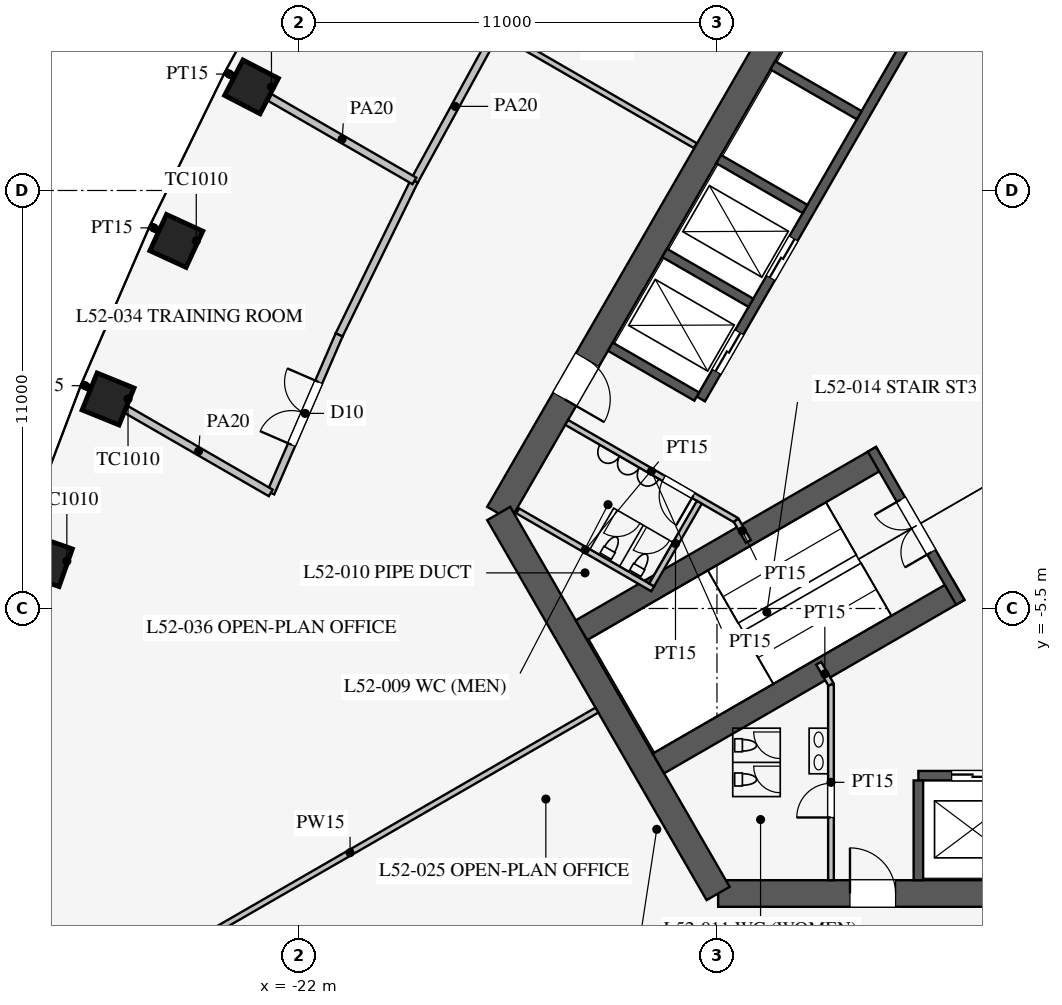
"""IFC4 building model, lengths in metres.
Left out: names, types, materials, properties, quantities, classifications, styles, units other than length and angle.
Written with IfcOpenShell. Run it as: python <this file> out.ifc"""

import sys

from ifc_helpers import new_model, si_unit, direction, frame, frame_2d, origin, origin_2d, place, context, subcontext, project, spatial, rectangle, extrude, element, fill, save


model = new_model("IFC4")
c1 = context("Model", 3, precision=1e-05, world=origin(), true_north=direction((0.0, 1.0)))
c2 = subcontext(c1, "Body", "Model", "MODEL_VIEW")
j1 = project(units=[si_unit("LENGTHUNIT", "METRE"), si_unit("PLANEANGLEUNIT", "RADIAN")], contexts=[c1])
p1 = place(None, origin())
s1 = spatial("IfcSite", under=j1, at=p1, CompositionType="ELEMENT")
p2 = place(p1, origin())
s2 = spatial("IfcBuilding", under=s1, at=p2, CompositionType="ELEMENT")
p3 = place(p2, frame((0.0, 0.0, 227.5)))
s3 = spatial("IfcBuildingStorey", under=s2, at=p3, CompositionType="ELEMENT", Elevation=227.5)
for number, where, z_axis, x_axis in (
    (1, (-23.248, 8.226, 0.0), (0.0, 0.0, 1.0), (-0.46, -0.888, 0.0)),
    (2, (-25.227, 4.172, 0.0), (0.0, 0.0, 1.0), (-0.418, -0.908, 0.0)),
    (3, (-27.022, 0.013, 0.0), (0.0, 0.0, 1.0), (-0.376, -0.927, 0.0)),
    (4, (-28.632, -4.254, 0.0), (0.0, 0.0, 1.0), (-0.332, -0.943, 0.0)),
):
    element("IfcColumn", number, at=place(p3, frame(where, z_axis=z_axis, x_axis=x_axis)), inside=s3, PredefinedType="COLUMN", context=c2, shape_type="SweptSolid", body=[
        extrude(rectangle(XDim=1.05, YDim=1.05, at=origin_2d()), origin(), (0.0, 0.0, 1.0), 4.2),
    ])
p4 = place(p3, frame((-10.97, -13.0, 0.0), z_axis=(0.0, 0.0, 1.0), x_axis=(1.0, 0.0, 0.0)))
e5 = element("IfcWall", 5, at=p4, inside=s3, PredefinedType="SHEAR", context=c2, shape_type="SweptSolid", body=[
    extrude(rectangle(XDim=21.939, YDim=0.7, at=frame_2d((10.97, 0.0))), origin(), (0.0, 0.0, 1.0), 4.2),
])
p5 = place(p4, frame((17.27, 0.0, 0.0)))
e6 = element("IfcOpeningElement", 6, at=p5, cuts=e5, PredefinedType="OPENING", context=c2, shape_type="SweptSolid", body=[
    extrude(rectangle(XDim=1.2, YDim=2.1, at=frame_2d((0.6, 1.05))), frame((0.0, 0.36, 0.0), z_axis=(0.0, -1.0, 0.0), x_axis=(1.0, 0.0, 0.0)), (0.0, 0.0, 1.0), 0.72),
])
p6 = place(p4, frame((3.47, 0.0, 0.0)))
e7 = element("IfcOpeningElement", 7, at=p6, cuts=e5, PredefinedType="OPENING", context=c2, shape_type="SweptSolid", body=[
    extrude(rectangle(XDim=1.2, YDim=2.1, at=frame_2d((0.6, 1.05))), frame((0.0, 0.36, 0.0), z_axis=(0.0, -1.0, 0.0), x_axis=(1.0, 0.0, 0.0)), (0.0, 0.0, 1.0), 0.72),
])
p7 = place(p3, frame((-5.773, 16.0, 0.0), z_axis=(0.0, 0.0, 1.0), x_axis=(-0.500002442456, -0.866023993627, 0.0)))
e8 = element("IfcWall", 8, at=p7, inside=s3, PredefinedType="SHEAR", context=c2, shape_type="SweptSolid", body=[
    extrude(rectangle(XDim=21.939, YDim=0.7, at=frame_2d((10.97, 0.0))), origin(), (0.0, 0.0, 1.0), 4.2),
])
p8 = place(p7, frame((17.27, 0.0, 0.0)))
e9 = element("IfcOpeningElement", 9, at=p8, cuts=e8, PredefinedType="OPENING", context=c2, shape_type="SweptSolid", body=[
    extrude(rectangle(XDim=1.2, YDim=2.1, at=frame_2d((0.6, 1.05))), frame((0.0, 0.36, 0.0), z_axis=(0.0, -1.0, 0.0), x_axis=(1.0, 0.0, 0.0)), (0.0, 0.0, 1.0), 0.72),
])
p9 = place(p7, frame((3.47, 0.0, 0.0)))
e10 = element("IfcOpeningElement", 10, at=p9, cuts=e8, PredefinedType="OPENING", context=c2, shape_type="SweptSolid", body=[
    extrude(rectangle(XDim=1.2, YDim=2.1, at=frame_2d((0.6, 1.05))), frame((0.0, 0.36, 0.0), z_axis=(0.0, -1.0, 0.0), x_axis=(1.0, 0.0, 0.0)), (0.0, 0.0, 1.0), 0.72),
])
p10 = place(p3, frame((-16.743, -3.0, 0.0), z_axis=(0.0, 0.0, 1.0), x_axis=(0.499995765644, -0.866027848477, 0.0)))
e11 = element("IfcWall", 11, at=p10, inside=s3, PredefinedType="SHEAR", context=c2, shape_type="SweptSolid", body=[
    extrude(rectangle(XDim=11.547, YDim=0.7, at=frame_2d((5.773, 0.0))), origin(), (0.0, 0.0, 1.0), 4.2),
])
p11 = place(p3, frame((-5.7, -9.9, 0.0), z_axis=(0.0, 0.0, 1.0), x_axis=(1.0, 0.0, 0.0)))
e12 = element("IfcWall", 12, at=p11, inside=s3, PredefinedType="SHEAR", context=c2, shape_type="SweptSolid", body=[
    extrude(rectangle(XDim=11.4, YDim=0.25, at=frame_2d((5.7, 0.0))), origin(), (0.0, 0.0, 1.0), 4.2),
])
p12 = place(p11, frame((0.875, 0.0, 0.0)))
e13 = element("IfcOpeningElement", 13, at=p12, cuts=e12, PredefinedType="OPENING", context=c2, shape_type="SweptSolid", body=[
    extrude(rectangle(XDim=1.1, YDim=2.2, at=frame_2d((0.55, 1.1))), frame((0.0, 0.135, 0.0), z_axis=(0.0, -1.0, 0.0), x_axis=(1.0, 0.0, 0.0)), (0.0, 0.0, 1.0), 0.27),
])
p13 = place(p11, frame((3.725, 0.0, 0.0)))
e14 = element("IfcOpeningElement", 14, at=p13, cuts=e12, PredefinedType="OPENING", context=c2, shape_type="SweptSolid", body=[
    extrude(rectangle(XDim=1.1, YDim=2.2, at=frame_2d((0.55, 1.1))), frame((0.0, 0.135, 0.0), z_axis=(0.0, -1.0, 0.0), x_axis=(1.0, 0.0, 0.0)), (0.0, 0.0, 1.0), 0.27),
])
p14 = place(p11, frame((6.575, 0.0, 0.0)))
e15 = element("IfcOpeningElement", 15, at=p14, cuts=e12, PredefinedType="OPENING", context=c2, shape_type="SweptSolid", body=[
    extrude(rectangle(XDim=1.1, YDim=2.2, at=frame_2d((0.55, 1.1))), frame((0.0, 0.135, 0.0), z_axis=(0.0, -1.0, 0.0), x_axis=(1.0, 0.0, 0.0)), (0.0, 0.0, 1.0), 0.27),
])
p15 = place(p11, frame((9.425, 0.0, 0.0)))
e16 = element("IfcOpeningElement", 16, at=p15, cuts=e12, PredefinedType="OPENING", context=c2, shape_type="SweptSolid", body=[
    extrude(rectangle(XDim=1.1, YDim=2.2, at=frame_2d((0.55, 1.1))), frame((0.0, 0.135, 0.0), z_axis=(0.0, -1.0, 0.0), x_axis=(1.0, 0.0, 0.0)), (0.0, 0.0, 1.0), 0.27),
])
p16 = place(p3, frame((-5.7, -10.025, 0.0), z_axis=(0.0, 0.0, 1.0), x_axis=(0.0, -1.0, 0.0)))
e17 = element("IfcWall", 17, at=p16, inside=s3, PredefinedType="SHEAR", context=c2, shape_type="SweptSolid", body=[
    extrude(rectangle(XDim=2.625, YDim=0.25, at=frame_2d((1.312, 0.0))), origin(), (0.0, 0.0, 1.0), 4.2),
])
p17 = place(p3, frame((-5.724, 9.886, 0.0), z_axis=(0.0, 0.0, 1.0), x_axis=(-0.500001763848, -0.866024385424, 0.0)))
e18 = element("IfcWall", 18, at=p17, inside=s3, PredefinedType="SHEAR", context=c2, shape_type="SweptSolid", body=[
    extrude(rectangle(XDim=11.4, YDim=0.25, at=frame_2d((5.7, 0.0))), origin(), (0.0, 0.0, 1.0), 4.2),
])
p18 = place(p17, frame((6.525, 0.0, 0.0)))
e19 = element("IfcOpeningElement", 19, at=p18, cuts=e18, PredefinedType="OPENING", context=c2, shape_type="SweptSolid", body=[
    extrude(rectangle(XDim=1.2, YDim=2.2, at=frame_2d((0.6, 1.1))), frame((0.0, 0.135, 0.0), z_axis=(0.0, -1.0, 0.0), x_axis=(1.0, 0.0, 0.0)), (0.0, 0.0, 1.0), 0.27),
])
p19 = place(p17, frame((9.375, 0.0, 0.0)))
e20 = element("IfcOpeningElement", 20, at=p19, cuts=e18, PredefinedType="OPENING", context=c2, shape_type="SweptSolid", body=[
    extrude(rectangle(XDim=1.2, YDim=2.2, at=frame_2d((0.6, 1.1))), frame((0.0, 0.135, 0.0), z_axis=(0.0, -1.0, 0.0), x_axis=(1.0, 0.0, 0.0)), (0.0, 0.0, 1.0), 0.27),
])
for number, where, z_axis, x_axis in (
    (21, (-7.257, 7.481, 0.0), (0.0, 0.0, 1.0), (-0.866, 0.5, 0.0)),
    (22, (-8.682, 5.012, 0.0), (0.0, 0.0, 1.0), (-0.866, 0.5, 0.0)),
    (23, (-10.107, 2.544, 0.0), (0.0, 0.0, 1.0), (-0.866, 0.5, 0.0)),
    (24, (-11.532, 0.076, 0.0), (0.0, 0.0, 1.0), (-0.866, 0.5, 0.0)),
):
    element("IfcWall", number, at=place(p3, frame(where, z_axis=z_axis, x_axis=x_axis)), inside=s3, PredefinedType="SHEAR", context=c2, shape_type="SweptSolid", body=[
        extrude(rectangle(XDim=2.625, YDim=0.25, at=frame_2d((1.312, 0.0))), origin(), (0.0, 0.0, 1.0), 4.2),
    ])
for number, where, z_axis, x_axis in (
    (25, (-6.663, -1.509, 0.0), (0.0, 0.0, 1.0), (-0.866, -0.5, 0.0)),
    (26, (-4.638, -5.016, 0.0), (0.0, 0.0, 1.0), (-0.866, -0.5, 0.0)),
):
    element("IfcWall", number, at=place(p3, frame(where, z_axis=z_axis, x_axis=x_axis)), inside=s3, PredefinedType="SHEAR", context=c2, shape_type="SweptSolid", body=[
        extrude(rectangle(XDim=9.125, YDim=0.6, at=frame_2d((4.562, 0.0))), origin(), (0.0, 0.0, 1.0), 4.2),
    ])
p20 = place(p3, frame((-6.922, -1.312, 0.0), z_axis=(0.0, 0.0, 1.0), x_axis=(0.499984536904, -0.866034331223, 0.0)))
e27 = element("IfcWall", 27, at=p20, inside=s3, PredefinedType="SHEAR", context=c2, shape_type="SweptSolid", body=[
    extrude(rectangle(XDim=4.65, YDim=0.25, at=frame_2d((2.325, 0.0))), origin(), (0.0, 0.0, 1.0), 4.2),
])
p21 = place(p20, frame((1.525, 0.0, 0.0)))
e28 = element("IfcOpeningElement", 28, at=p21, cuts=e27, PredefinedType="OPENING", context=c2, shape_type="SweptSolid", body=[
    extrude(rectangle(XDim=1.6, YDim=2.1, at=frame_2d((0.8, 1.05))), frame((0.0, 0.135, 0.0), z_axis=(0.0, -1.0, 0.0), x_axis=(1.0, 0.0, 0.0)), (0.0, 0.0, 1.0), 0.27),
])
p22 = place(p3, frame((-8.0, -7.5, 0.0), z_axis=(0.0, 0.0, 1.0), x_axis=(0.0, -1.0, 0.0)))
e29 = element("IfcWall", 29, at=p22, inside=s3, PredefinedType="PARTITIONING", context=c2, shape_type="SweptSolid", body=[
    extrude(rectangle(XDim=5.15, YDim=0.15, at=frame_2d((2.575, 0.0))), origin(), (0.0, 0.0, 1.0), 4.0),
])
p23 = place(p22, frame((2.6, 0.0, 0.0)))
e30 = element("IfcOpeningElement", 30, at=p23, cuts=e29, PredefinedType="OPENING", context=c2, shape_type="SweptSolid", body=[
    extrude(rectangle(XDim=0.9, YDim=2.1, at=frame_2d((0.45, 1.05))), frame((0.0, 0.085, 0.0), z_axis=(0.0, -1.0, 0.0), x_axis=(1.0, 0.0, 0.0)), (0.0, 0.0, 1.0), 0.17),
])
p24 = place(p3, frame((-10.495, -3.178, 0.0), z_axis=(0.0, 0.0, 1.0), x_axis=(-0.866037967349, 0.499978238636, 0.0)))
e31 = element("IfcWall", 31, at=p24, inside=s3, PredefinedType="PARTITIONING", context=c2, shape_type="SweptSolid", body=[
    extrude(rectangle(XDim=5.15, YDim=0.15, at=frame_2d((2.575, 0.0))), origin(), (0.0, 0.0, 1.0), 4.0),
])
p25 = place(p24, frame((1.3, 0.0, 0.0)))
e32 = element("IfcOpeningElement", 32, at=p25, cuts=e31, PredefinedType="OPENING", context=c2, shape_type="SweptSolid", body=[
    extrude(rectangle(XDim=0.9, YDim=2.1, at=frame_2d((0.45, 1.05))), frame((0.0, 0.085, 0.0), z_axis=(0.0, -1.0, 0.0), x_axis=(1.0, 0.0, 0.0)), (0.0, 0.0, 1.0), 0.17),
])
for number, where, z_axis, x_axis in (
    (33, (-10.495, -3.178, 0.0), (0.0, 0.0, 1.0), (0.5, -0.866, 0.0)),
    (34, (-8.0, -7.5, 0.0), (0.0, 0.0, 1.0), (-0.5, 0.866, 0.0)),
):
    element("IfcWall", number, at=place(p3, frame(where, z_axis=z_axis, x_axis=x_axis)), inside=s3, PredefinedType="PARTITIONING", context=c2, shape_type="SweptSolid", body=[
        extrude(rectangle(XDim=0.645, YDim=0.15, at=frame_2d((0.323, 0.0))), origin(), (0.0, 0.0, 1.0), 4.0),
    ])
p26 = place(p3, frame((-12.691, -4.982, 0.0), z_axis=(0.0, 0.0, 1.0), x_axis=(-0.8660249478, 0.500000789788, 0.0)))
e35 = element("IfcWall", 35, at=p26, inside=s3, PredefinedType="PARTITIONING", context=c2, shape_type="SweptSolid", body=[
    extrude(rectangle(XDim=4.1, YDim=0.15, at=frame_2d((2.05, 0.0))), origin(), (0.0, 0.0, 1.0), 4.0),
])
p27 = place(p3, frame((-11.464, -2.706, 0.0), z_axis=(0.0, 0.0, 1.0), x_axis=(-0.50001992892, -0.866013897511, 0.0)))
e36 = element("IfcWall", 36, at=p27, inside=s3, PredefinedType="PARTITIONING", context=c2, shape_type="SweptSolid", body=[
    extrude(rectangle(XDim=2.51, YDim=0.15, at=frame_2d((1.255, 0.0))), origin(), (0.0, 0.0, 1.0), 4.0),
])
p28 = place(p3, frame((-14.159, -8.175, 0.0), z_axis=(0.0, 0.0, 1.0), x_axis=(-0.866027028085, -0.499997186618, 0.0)))
e37 = element("IfcWall", 37, at=p28, inside=s3, PredefinedType="PARTITIONING", context=c2, shape_type="SweptSolid", body=[
    extrude(rectangle(XDim=15.0, YDim=0.15, at=frame_2d((7.5, 0.0))), origin(), (0.0, 0.0, 1.0), 2.4),
])
p29 = place(p3, frame((-11.57, 6.68, 0.0), z_axis=(0.0, 0.0, 1.0), x_axis=(-0.866028972293, 0.499993819111, 0.0)))
e38 = element("IfcWall", 38, at=p29, inside=s3, PredefinedType="PARTITIONING", context=c2, shape_type="SweptSolid", body=[
    extrude(rectangle(XDim=10.436, YDim=0.15, at=frame_2d((5.218, 0.0))), origin(), (0.0, 0.0, 1.0), 3.3),
])
p30 = place(p3, frame((-27.539, 0.311, 0.0), z_axis=(0.0, 0.0, 1.0), x_axis=(-0.865534352121, 0.500849563539, 0.0)))
e39 = element("IfcWall", 39, at=p30, inside=s3, PredefinedType="PARTITIONING", context=c2, shape_type="SweptSolid", body=[
    extrude(rectangle(XDim=0.206, YDim=0.15, at=frame_2d((0.103, 0.0))), origin(), (0.0, 0.0, 1.0), 2.9),
])
p31 = place(p3, frame((-23.727, 8.502, 0.0), z_axis=(0.0, 0.0, 1.0), x_axis=(-0.866135455726, 0.499809335981, 0.0)))
e40 = element("IfcWall", 40, at=p31, inside=s3, PredefinedType="PARTITIONING", context=c2, shape_type="SweptSolid", body=[
    extrude(rectangle(XDim=0.243, YDim=0.15, at=frame_2d((0.122, 0.0))), origin(), (0.0, 0.0, 1.0), 2.9),
])
p32 = place(p3, frame((-25.725, 4.46, 0.0), z_axis=(0.0, 0.0, 1.0), x_axis=(-0.865675623716, 0.500605348058, 0.0)))
e41 = element("IfcWall", 41, at=p32, inside=s3, PredefinedType="PARTITIONING", context=c2, shape_type="SweptSolid", body=[
    extrude(rectangle(XDim=0.223, YDim=0.15, at=frame_2d((0.112, 0.0))), origin(), (0.0, 0.0, 1.0), 2.9),
])
p33 = place(p3, frame((-16.802, 9.7, 0.0), z_axis=(0.0, 0.0, 1.0), x_axis=(-0.479949984371, -0.877295852322, 0.0)))
e42 = element("IfcWall", 42, at=p33, inside=s3, PredefinedType="PARTITIONING", context=c2, shape_type="SweptSolid", body=[
    extrude(rectangle(XDim=4.501, YDim=0.2, at=frame_2d((2.25, 0.0))), origin(), (0.0, 0.0, 1.0), 2.9),
])
p34 = place(p3, frame((-18.962, 5.751, 0.0), z_axis=(0.0, 0.0, 1.0), x_axis=(-0.43911984878, -0.898428493764, 0.0)))
e43 = element("IfcWall", 43, at=p34, inside=s3, PredefinedType="PARTITIONING", context=c2, shape_type="SweptSolid", body=[
    extrude(rectangle(XDim=4.511, YDim=0.2, at=frame_2d((2.255, 0.0))), origin(), (0.0, 0.0, 1.0), 2.9),
])
p35 = place(p3, frame((-20.943, 1.699, 0.0), z_axis=(0.0, 0.0, 1.0), x_axis=(-0.397253491631, -0.917708920839, 0.0)))
e44 = element("IfcWall", 44, at=p35, inside=s3, PredefinedType="PARTITIONING", context=c2, shape_type="SweptSolid", body=[
    extrude(rectangle(XDim=4.53, YDim=0.2, at=frame_2d((2.265, 0.0))), origin(), (0.0, 0.0, 1.0), 2.9),
])
p36 = place(p35, frame((1.35, 0.0, 0.15)))
e45 = element("IfcOpeningElement", 45, at=p36, cuts=e44, PredefinedType="OPENING", context=c2, shape_type="SweptSolid", body=[
    extrude(rectangle(XDim=1.8, YDim=2.1, at=frame_2d((0.9, 1.05))), frame((0.0, 0.11, 0.0), z_axis=(0.0, -1.0, 0.0), x_axis=(1.0, 0.0, 0.0)), (0.0, 0.0, 1.0), 0.22),
])
p37 = place(p3, frame((-22.742, -2.458, 0.0), z_axis=(0.0, 0.0, 1.0), x_axis=(-0.866033427365, 0.499986102494, 0.0)))
e46 = element("IfcWall", 46, at=p37, inside=s3, PredefinedType="PARTITIONING", context=c2, shape_type="SweptSolid", body=[
    extrude(rectangle(XDim=4.382, YDim=0.2, at=frame_2d((2.191, 0.0))), origin(), (0.0, 0.0, 1.0), 2.9),
])
p38 = place(p3, frame((-18.962, 5.751, 0.0), z_axis=(0.0, 0.0, 1.0), x_axis=(-0.866025498715, 0.499999835575, 0.0)))
e47 = element("IfcWall", 47, at=p38, inside=s3, PredefinedType="PARTITIONING", context=c2, shape_type="SweptSolid", body=[
    extrude(rectangle(XDim=4.394, YDim=0.2, at=frame_2d((2.197, 0.0))), origin(), (0.0, 0.0, 1.0), 2.9),
])
p39 = place(p23, frame((0.9, 0.0, 0.0), z_axis=(0.0, 0.0, 1.0), x_axis=(-1.0, 0.0, 0.0)))
e48 = element("IfcDoor", 48, at=p39, inside=s3, OperationType="SINGLE_SWING_LEFT", PredefinedType="DOOR", context=c2, shape_type="SweptSolid", body=[
    extrude(rectangle(XDim=0.9, YDim=2.1, at=frame_2d((0.45, 1.05))), frame((0.0, 0.025, 0.0), z_axis=(0.0, -1.0, 0.0), x_axis=(1.0, 0.0, 0.0)), (0.0, 0.0, 1.0), 0.05),
])
fill(e30, e48)
p40 = place(p25, origin())
e49 = element("IfcDoor", 49, at=p40, inside=s3, OperationType="SINGLE_SWING_LEFT", PredefinedType="DOOR", context=c2, shape_type="SweptSolid", body=[
    extrude(rectangle(XDim=0.9, YDim=2.1, at=frame_2d((0.45, 1.05))), frame((0.0, 0.025, 0.0), z_axis=(0.0, -1.0, 0.0), x_axis=(1.0, 0.0, 0.0)), (0.0, 0.0, 1.0), 0.05),
])
fill(e32, e49)
p41 = place(p21, frame((1.6, 0.0, 0.0), z_axis=(0.0, 0.0, 1.0), x_axis=(-1.0, 0.0, 0.0)))
e50 = element("IfcDoor", 50, at=p41, inside=s3, OperationType="DOUBLE_DOOR_SINGLE_SWING", PredefinedType="DOOR", context=c2, shape_type="SweptSolid", body=[
    extrude(rectangle(XDim=1.6, YDim=2.1, at=frame_2d((0.8, 1.05))), frame((0.0, 0.025, 0.0), z_axis=(0.0, -1.0, 0.0), x_axis=(1.0, 0.0, 0.0)), (0.0, 0.0, 1.0), 0.05),
])
fill(e28, e50)
p42 = place(p6, origin())
e51 = element("IfcDoor", 51, at=p42, inside=s3, OperationType="SINGLE_SWING_LEFT", PredefinedType="DOOR", context=c2, shape_type="SweptSolid", body=[
    extrude(rectangle(XDim=1.2, YDim=2.1, at=frame_2d((0.6, 1.05))), frame((0.0, 0.025, 0.0), z_axis=(0.0, -1.0, 0.0), x_axis=(1.0, 0.0, 0.0)), (0.0, 0.0, 1.0), 0.05),
])
fill(e7, e51)
p43 = place(p8, origin())
e52 = element("IfcDoor", 52, at=p43, inside=s3, OperationType="SINGLE_SWING_RIGHT", PredefinedType="DOOR", context=c2, shape_type="SweptSolid", body=[
    extrude(rectangle(XDim=1.2, YDim=2.1, at=frame_2d((0.6, 1.05))), frame((0.0, 0.025, 0.0), z_axis=(0.0, -1.0, 0.0), x_axis=(1.0, 0.0, 0.0)), (0.0, 0.0, 1.0), 0.05),
])
fill(e9, e52)
p44 = place(p36, frame((1.8, 0.0, 0.0), z_axis=(0.0, 0.0, 1.0), x_axis=(-1.0, 0.0, 0.0)))
e53 = element("IfcDoor", 53, at=p44, inside=s3, OperationType="DOUBLE_DOOR_SINGLE_SWING", PredefinedType="DOOR", context=c2, shape_type="SweptSolid", body=[
    extrude(rectangle(XDim=1.8, YDim=2.1, at=frame_2d((0.9, 1.05))), frame((0.0, 0.025, 0.0), z_axis=(0.0, -1.0, 0.0), x_axis=(1.0, 0.0, 0.0)), (0.0, 0.0, 1.0), 0.05),
])
fill(e45, e53)
p45 = place(p12, origin())
e54 = element("IfcDoor", 54, at=p45, inside=s3, OperationType="DOUBLE_DOOR_SLIDING", PredefinedType="DOOR", context=c2, shape_type="SweptSolid", body=[
    extrude(rectangle(XDim=1.1, YDim=2.2, at=frame_2d((0.55, 1.1))), frame((0.0, 0.025, 0.0), z_axis=(0.0, -1.0, 0.0), x_axis=(1.0, 0.0, 0.0)), (0.0, 0.0, 1.0), 0.05),
])
fill(e13, e54)
p46 = place(p18, origin())
e55 = element("IfcDoor", 55, at=p46, inside=s3, OperationType="DOUBLE_DOOR_SLIDING", PredefinedType="DOOR", context=c2, shape_type="SweptSolid", body=[
    extrude(rectangle(XDim=1.2, YDim=2.2, at=frame_2d((0.6, 1.1))), frame((0.0, 0.025, 0.0), z_axis=(0.0, -1.0, 0.0), x_axis=(1.0, 0.0, 0.0)), (0.0, 0.0, 1.0), 0.05),
])
fill(e19, e55)
p47 = place(p19, origin())
e56 = element("IfcDoor", 56, at=p47, inside=s3, OperationType="DOUBLE_DOOR_SLIDING", PredefinedType="DOOR", context=c2, shape_type="SweptSolid", body=[
    extrude(rectangle(XDim=1.2, YDim=2.2, at=frame_2d((0.6, 1.1))), frame((0.0, 0.025, 0.0), z_axis=(0.0, -1.0, 0.0), x_axis=(1.0, 0.0, 0.0)), (0.0, 0.0, 1.0), 0.05),
])
fill(e20, e56)
save(model, sys.argv[1])
